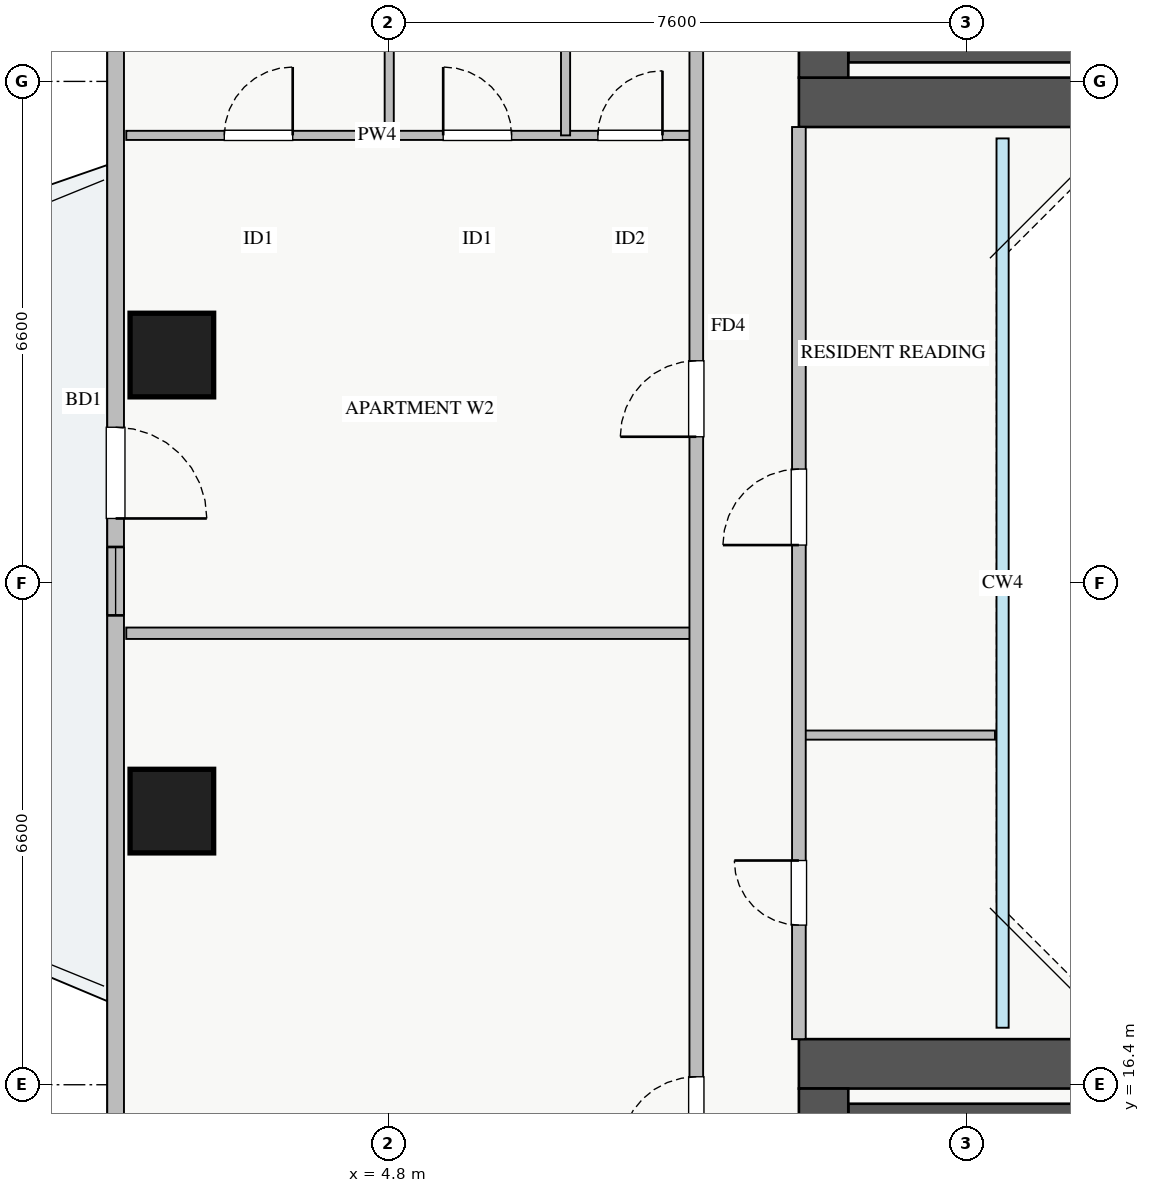
"""IFC4 building model, lengths in metres.
Left out: names, types, materials, properties, quantities, classifications, styles, units other than length and angle.
Written with IfcOpenShell. Run it as: python <this file> out.ifc"""

import sys

from ifc_helpers import new_model, si_unit, direction, frame, frame_2d, origin, origin_2d, place, context, subcontext, project, spatial, rectangle, extrude, source, transform, mapped, element, fill, save


model = new_model("IFC4")
c1 = context("Model", 3, precision=1e-05, world=origin(), true_north=direction((0.0, 1.0)))
c2 = subcontext(c1, "Body", "Model", "MODEL_VIEW")
j1 = project(units=[si_unit("LENGTHUNIT", "METRE"), si_unit("PLANEANGLEUNIT", "RADIAN")], contexts=[c1])
p1 = place(None, origin())
s1 = spatial("IfcSite", under=j1, at=p1, CompositionType="ELEMENT")
p2 = place(p1, origin())
s2 = spatial("IfcBuilding", under=s1, at=p2, CompositionType="ELEMENT")
p3 = place(p2, frame((0.0, 0.0, 119.75)))
s3 = spatial("IfcBuildingStorey", under=s2, at=p3, CompositionType="ELEMENT", Elevation=119.75)
for number, where, z_axis, x_axis in (
    (1, (10.85, 29.95, 0.0), (0.0, 0.0, 1.0), (1.0, 0.0, 0.0)),
    (2, (10.85, 16.05, 0.0), (0.0, 0.0, 1.0), (1.0, 0.0, 0.0)),
):
    element("IfcWall", number, at=place(p3, frame(where, z_axis=z_axis, x_axis=x_axis)), inside=s3, PredefinedType="SHEAR", context=c2, shape_type="SweptSolid", body=[
        extrude(rectangle(XDim=7.3, YDim=0.2, at=frame_2d((3.65, 0.0))), origin(), (0.0, 0.0, 1.0), 3.25),
    ])
p4 = place(p3, frame((10.2, 29.325, 0.0), z_axis=(0.0, 0.0, 1.0), x_axis=(1.0, 0.0, 0.0)))
e3 = element("IfcWall", 3, at=p4, inside=s3, PredefinedType="SHEAR", context=c2, shape_type="SweptSolid", body=[
    extrude(rectangle(XDim=17.6, YDim=0.65, at=frame_2d((8.8, 0.0))), origin(), (0.0, 0.0, 1.0), 3.25),
])
p5 = place(p3, frame((10.525, 29.65, 0.0), z_axis=(0.0, 0.0, 1.0), x_axis=(0.0, 1.0, 0.0)))
e4 = element("IfcWall", 4, at=p5, inside=s3, PredefinedType="SHEAR", context=c2, shape_type="SweptSolid", body=[
    extrude(rectangle(XDim=5.9, YDim=0.65, at=frame_2d((2.95, 0.0))), origin(), (0.0, 0.0, 1.0), 3.25),
])
p6 = place(p3, frame((10.2, 16.675, 0.0), z_axis=(0.0, 0.0, 1.0), x_axis=(1.0, 0.0, 0.0)))
e5 = element("IfcWall", 5, at=p6, inside=s3, PredefinedType="SHEAR", context=c2, shape_type="SweptSolid", body=[
    extrude(rectangle(XDim=17.6, YDim=0.65, at=frame_2d((8.8, 0.0))), origin(), (0.0, 0.0, 1.0), 3.25),
])
p7 = place(p3, frame((10.525, 10.45, 0.0), z_axis=(0.0, 0.0, 1.0), x_axis=(0.0, 1.0, 0.0)))
e6 = element("IfcWall", 6, at=p7, inside=s3, PredefinedType="SHEAR", context=c2, shape_type="SweptSolid", body=[
    extrude(rectangle(XDim=5.9, YDim=0.65, at=frame_2d((2.95, 0.0))), origin(), (0.0, 0.0, 1.0), 3.25),
])
m1 = source(origin(), c2, "Body", "SweptSolid", [
    extrude(rectangle(XDim=1.1, YDim=1.1, at=origin_2d()), origin(), (0.0, 0.0, 1.0), 3.25),
])
for number, where, z_axis, x_axis in (
    (7, (1.95, 26.0, 0.0), (0.0, 0.0, 1.0), (1.0, 0.0, 0.0)),
    (8, (1.95, 20.0, 0.0), (0.0, 0.0, 1.0), (1.0, 0.0, 0.0)),
):
    element("IfcColumn", number, at=place(p3, frame(where, z_axis=z_axis, x_axis=x_axis)), inside=s3, PredefinedType="COLUMN", context=c2, shape_type="MappedRepresentation", body=[
        mapped(m1, transform((0.0, 0.0, 0.0), x_axis=(1.0, 0.0, 0.0), y_axis=(0.0, 1.0, 0.0), z_axis=(0.0, 0.0, 1.0), scale=1.0)),
    ])
p8 = place(p3, frame((1.21, 10.55, 0.0), z_axis=(0.0, 0.0, 1.0), x_axis=(0.0, 1.0, 0.0)))
e9 = element("IfcWall", 9, at=p8, inside=s3, PredefinedType="STANDARD", context=c2, shape_type="SweptSolid", body=[
    extrude(rectangle(XDim=24.9, YDim=0.22, at=frame_2d((12.45, 0.0))), origin(), (0.0, 0.0, 1.0), 2.61),
])
p9 = place(p8, frame((13.3, 0.0, 0.0)))
e10 = element("IfcOpeningElement", 10, at=p9, cuts=e9, PredefinedType="OPENING", context=c2, shape_type="SweptSolid", body=[
    extrude(rectangle(XDim=1.2, YDim=2.1, at=frame_2d((0.6, 1.05))), frame((0.0, 0.12, 0.0), z_axis=(0.0, -1.0, 0.0), x_axis=(1.0, 0.0, 0.0)), (0.0, 0.0, 1.0), 0.24),
])
p10 = place(p8, frame((1.912, 0.0, 0.9)))
e11 = element("IfcOpeningElement", 11, at=p10, cuts=e9, PredefinedType="OPENING", context=c2, shape_type="SweptSolid", body=[
    extrude(rectangle(XDim=2.4, YDim=1.48, at=frame_2d((1.2, 0.74))), frame((0.0, 0.12, 0.0), z_axis=(0.0, -1.0, 0.0), x_axis=(1.0, 0.0, 0.0)), (0.0, 0.0, 1.0), 0.24),
])
p11 = place(p8, frame((20.737, 0.0, 0.9)))
e12 = element("IfcOpeningElement", 12, at=p11, cuts=e9, PredefinedType="OPENING", context=c2, shape_type="SweptSolid", body=[
    extrude(rectangle(XDim=2.1, YDim=1.48, at=frame_2d((1.05, 0.74))), frame((0.0, 0.12, 0.0), z_axis=(0.0, -1.0, 0.0), x_axis=(1.0, 0.0, 0.0)), (0.0, 0.0, 1.0), 0.24),
])
p12 = place(p8, frame((12.025, 0.0, 0.9)))
e13 = element("IfcOpeningElement", 13, at=p12, cuts=e9, PredefinedType="OPENING", context=c2, shape_type="SweptSolid", body=[
    extrude(rectangle(XDim=0.9, YDim=1.2, at=frame_2d((0.45, 0.6))), frame((0.0, 0.12, 0.0), z_axis=(0.0, -1.0, 0.0), x_axis=(1.0, 0.0, 0.0)), (0.0, 0.0, 1.0), 0.24),
])
p13 = place(p3, frame((1.35, 28.89, 0.0), z_axis=(0.0, 0.0, 1.0), x_axis=(1.0, 0.0, 0.0)))
e14 = element("IfcWall", 14, at=p13, inside=s3, PredefinedType="PLUMBINGWALL", context=c2, shape_type="SweptSolid", body=[
    extrude(rectangle(XDim=7.5, YDim=0.12, at=frame_2d((3.75, 0.0))), origin(), (0.0, 0.0, 1.0), 3.07),
])
p14 = place(p13, frame((1.29, 0.0, 0.0)))
e15 = element("IfcOpeningElement", 15, at=p14, cuts=e14, PredefinedType="OPENING", context=c2, shape_type="SweptSolid", body=[
    extrude(rectangle(XDim=0.9, YDim=2.05, at=frame_2d((0.45, 1.025))), frame((0.0, 0.07, 0.0), z_axis=(0.0, -1.0, 0.0), x_axis=(1.0, 0.0, 0.0)), (0.0, 0.0, 1.0), 0.14),
])
p15 = place(p13, frame((4.17, 0.0, 0.0)))
e16 = element("IfcOpeningElement", 16, at=p15, cuts=e14, PredefinedType="OPENING", context=c2, shape_type="SweptSolid", body=[
    extrude(rectangle(XDim=0.9, YDim=2.05, at=frame_2d((0.45, 1.025))), frame((0.0, 0.07, 0.0), z_axis=(0.0, -1.0, 0.0), x_axis=(1.0, 0.0, 0.0)), (0.0, 0.0, 1.0), 0.14),
])
p16 = place(p13, frame((6.205, 0.0, 0.0)))
e17 = element("IfcOpeningElement", 17, at=p16, cuts=e14, PredefinedType="OPENING", context=c2, shape_type="SweptSolid", body=[
    extrude(rectangle(XDim=0.85, YDim=2.05, at=frame_2d((0.425, 1.025))), frame((0.0, 0.07, 0.0), z_axis=(0.0, -1.0, 0.0), x_axis=(1.0, 0.0, 0.0)), (0.0, 0.0, 1.0), 0.14),
])
p17 = place(p3, frame((4.81, 28.89, 0.0), z_axis=(0.0, 0.0, 1.0), x_axis=(0.0, 1.0, 0.0)))
e18 = element("IfcWall", 18, at=p17, inside=s3, PredefinedType="PLUMBINGWALL", context=c2, shape_type="SweptSolid", body=[
    extrude(rectangle(XDim=7.09, YDim=0.12, at=frame_2d((3.545, 0.0))), origin(), (0.0, 0.0, 1.0), 3.07),
])
p18 = place(p3, frame((7.13, 28.89, 0.0), z_axis=(0.0, 0.0, 1.0), x_axis=(0.0, 1.0, 0.0)))
e19 = element("IfcWall", 19, at=p18, inside=s3, PredefinedType="PLUMBINGWALL", context=c2, shape_type="SweptSolid", body=[
    extrude(rectangle(XDim=7.09, YDim=0.12, at=frame_2d((3.545, 0.0))), origin(), (0.0, 0.0, 1.0), 2.577),
])
p19 = place(p3, frame((1.35, 22.34, 0.0), z_axis=(0.0, 0.0, 1.0), x_axis=(1.0, 0.0, 0.0)))
e20 = element("IfcWall", 20, at=p19, inside=s3, PredefinedType="PARTITIONING", context=c2, shape_type="SweptSolid", body=[
    extrude(rectangle(XDim=7.5, YDim=0.15, at=frame_2d((3.75, 0.0))), origin(), (0.0, 0.0, 1.0), 3.07),
])
p20 = place(p3, frame((8.85, 8.25, 0.0), z_axis=(0.0, 0.0, 1.0), x_axis=(0.0, 1.0, 0.0)))
e21 = element("IfcWall", 21, at=p20, inside=s3, PredefinedType="PARTITIONING", context=c2, shape_type="SweptSolid", body=[
    extrude(rectangle(XDim=29.5, YDim=0.18, at=frame_2d((14.75, 0.0))), origin(), (0.0, 0.0, 1.0), 3.07),
])
p21 = place(p20, frame((28.155, 0.0, 0.0)))
e22 = element("IfcOpeningElement", 22, at=p21, cuts=e21, PredefinedType="OPENING", context=c2, shape_type="SweptSolid", body=[
    extrude(rectangle(XDim=0.9, YDim=2.05, at=frame_2d((0.45, 1.025))), frame((0.0, 0.1, 0.0), z_axis=(0.0, -1.0, 0.0), x_axis=(1.0, 0.0, 0.0)), (0.0, 0.0, 1.0), 0.2),
])
p22 = place(p20, frame((0.27, 0.0, 0.0)))
e23 = element("IfcOpeningElement", 23, at=p22, cuts=e21, PredefinedType="OPENING", context=c2, shape_type="SweptSolid", body=[
    extrude(rectangle(XDim=0.9, YDim=2.05, at=frame_2d((0.45, 1.025))), frame((0.0, 0.1, 0.0), z_axis=(0.0, -1.0, 0.0), x_axis=(1.0, 0.0, 0.0)), (0.0, 0.0, 1.0), 0.2),
])
p23 = place(p20, frame((7.255, 0.0, 0.0)))
e24 = element("IfcOpeningElement", 24, at=p23, cuts=e21, PredefinedType="OPENING", context=c2, shape_type="SweptSolid", body=[
    extrude(rectangle(XDim=1.0, YDim=2.05, at=frame_2d((0.5, 1.025))), frame((0.0, 0.1, 0.0), z_axis=(0.0, -1.0, 0.0), x_axis=(1.0, 0.0, 0.0)), (0.0, 0.0, 1.0), 0.2),
])
p24 = place(p20, frame((16.675, 0.0, 0.0)))
e25 = element("IfcOpeningElement", 25, at=p24, cuts=e21, PredefinedType="OPENING", context=c2, shape_type="SweptSolid", body=[
    extrude(rectangle(XDim=1.0, YDim=2.05, at=frame_2d((0.5, 1.025))), frame((0.0, 0.1, 0.0), z_axis=(0.0, -1.0, 0.0), x_axis=(1.0, 0.0, 0.0)), (0.0, 0.0, 1.0), 0.2),
])
p25 = place(p3, frame((10.2, 21.0, 0.0), z_axis=(0.0, 0.0, 1.0), x_axis=(1.0, 0.0, 0.0)))
e26 = element("IfcWall", 26, at=p25, inside=s3, PredefinedType="PLUMBINGWALL", context=c2, shape_type="SweptSolid", body=[
    extrude(rectangle(XDim=2.58, YDim=0.12, at=frame_2d((1.29, 0.0))), origin(), (0.0, 0.0, 1.0), 3.07),
])
p26 = place(p3, frame((10.2, 17.0, 0.0), z_axis=(0.0, 0.0, 1.0), x_axis=(0.0, 1.0, 0.0)))
e27 = element("IfcWall", 27, at=p26, inside=s3, PredefinedType="PARTITIONING", context=c2, shape_type="SweptSolid", body=[
    extrude(rectangle(XDim=12.0, YDim=0.18, at=frame_2d((6.0, 0.0))), origin(), (0.0, 0.0, 1.0), 3.07),
])
p27 = place(p26, frame((1.5, 0.0, 0.0)))
e28 = element("IfcOpeningElement", 28, at=p27, cuts=e27, PredefinedType="OPENING", context=c2, shape_type="SweptSolid", body=[
    extrude(rectangle(XDim=0.85, YDim=2.05, at=frame_2d((0.425, 1.025))), frame((0.0, 0.1, 0.0), z_axis=(0.0, -1.0, 0.0), x_axis=(1.0, 0.0, 0.0)), (0.0, 0.0, 1.0), 0.2),
])
p28 = place(p26, frame((6.5, 0.0, 0.0)))
e29 = element("IfcOpeningElement", 29, at=p28, cuts=e27, PredefinedType="OPENING", context=c2, shape_type="SweptSolid", body=[
    extrude(rectangle(XDim=1.0, YDim=2.05, at=frame_2d((0.5, 1.025))), frame((0.0, 0.1, 0.0), z_axis=(0.0, -1.0, 0.0), x_axis=(1.0, 0.0, 0.0)), (0.0, 0.0, 1.0), 0.2),
])
m2 = source(origin(), c2, "Body", "SweptSolid", [
    extrude(rectangle(XDim=1.2, YDim=2.1, at=frame_2d((0.6, 1.05))), frame((0.0, 0.025, 0.0), z_axis=(0.0, -1.0, 0.0), x_axis=(1.0, 0.0, 0.0)), (0.0, 0.0, 1.0), 0.05),
])
p29 = place(p9, frame((1.2, 0.0, 0.0), z_axis=(0.0, 0.0, 1.0), x_axis=(-1.0, 0.0, 0.0)))
e30 = element("IfcDoor", 30, at=p29, inside=s3, OperationType="SINGLE_SWING_LEFT", PredefinedType="DOOR", context=c2, shape_type="MappedRepresentation", body=[
    mapped(m2, transform((0.0, 0.0, 0.0), x_axis=(1.0, 0.0, 0.0), y_axis=(0.0, 1.0, 0.0), z_axis=(0.0, 0.0, 1.0), scale=1.0)),
])
fill(e10, e30)
m3 = source(origin(), c2, "Body", "SweptSolid", [
    extrude(rectangle(XDim=0.9, YDim=2.05, at=frame_2d((0.45, 1.025))), frame((0.0, 0.025, 0.0), z_axis=(0.0, -1.0, 0.0), x_axis=(1.0, 0.0, 0.0)), (0.0, 0.0, 1.0), 0.05),
])
p30 = place(p14, origin())
e31 = element("IfcDoor", 31, at=p30, inside=s3, OperationType="SINGLE_SWING_RIGHT", PredefinedType="DOOR", context=c2, shape_type="MappedRepresentation", body=[
    mapped(m3, transform((0.0, 0.0, 0.0), x_axis=(1.0, 0.0, 0.0), y_axis=(0.0, 1.0, 0.0), z_axis=(0.0, 0.0, 1.0), scale=1.0)),
])
fill(e15, e31)
p31 = place(p15, origin())
e32 = element("IfcDoor", 32, at=p31, inside=s3, OperationType="SINGLE_SWING_LEFT", PredefinedType="DOOR", context=c2, shape_type="MappedRepresentation", body=[
    mapped(m3, transform((0.0, 0.0, 0.0), x_axis=(1.0, 0.0, 0.0), y_axis=(0.0, 1.0, 0.0), z_axis=(0.0, 0.0, 1.0), scale=1.0)),
])
fill(e16, e32)
m4 = source(origin(), c2, "Body", "SweptSolid", [
    extrude(rectangle(XDim=0.85, YDim=2.05, at=frame_2d((0.425, 1.025))), frame((0.0, 0.025, 0.0), z_axis=(0.0, -1.0, 0.0), x_axis=(1.0, 0.0, 0.0)), (0.0, 0.0, 1.0), 0.05),
])
p32 = place(p16, origin())
e33 = element("IfcDoor", 33, at=p32, inside=s3, OperationType="SINGLE_SWING_RIGHT", PredefinedType="DOOR", context=c2, shape_type="MappedRepresentation", body=[
    mapped(m4, transform((0.0, 0.0, 0.0), x_axis=(1.0, 0.0, 0.0), y_axis=(0.0, 1.0, 0.0), z_axis=(0.0, 0.0, 1.0), scale=1.0)),
])
fill(e17, e33)
m5 = source(origin(), c2, "Body", "SweptSolid", [
    extrude(rectangle(XDim=1.0, YDim=2.05, at=frame_2d((0.5, 1.025))), frame((0.0, 0.025, 0.0), z_axis=(0.0, -1.0, 0.0), x_axis=(1.0, 0.0, 0.0)), (0.0, 0.0, 1.0), 0.05),
])
p33 = place(p23, origin())
e34 = element("IfcDoor", 34, at=p33, inside=s3, OperationType="SINGLE_SWING_LEFT", PredefinedType="DOOR", context=c2, shape_type="MappedRepresentation", body=[
    mapped(m5, transform((0.0, 0.0, 0.0), x_axis=(1.0, 0.0, 0.0), y_axis=(0.0, 1.0, 0.0), z_axis=(0.0, 0.0, 1.0), scale=1.0)),
])
fill(e24, e34)
p34 = place(p24, origin())
e35 = element("IfcDoor", 35, at=p34, inside=s3, OperationType="SINGLE_SWING_LEFT", PredefinedType="DOOR", context=c2, shape_type="MappedRepresentation", body=[
    mapped(m5, transform((0.0, 0.0, 0.0), x_axis=(1.0, 0.0, 0.0), y_axis=(0.0, 1.0, 0.0), z_axis=(0.0, 0.0, 1.0), scale=1.0)),
])
fill(e25, e35)
p35 = place(p27, origin())
e36 = element("IfcDoor", 36, at=p35, inside=s3, OperationType="SINGLE_SWING_RIGHT", PredefinedType="DOOR", context=c2, shape_type="MappedRepresentation", body=[
    mapped(m4, transform((0.0, 0.0, 0.0), x_axis=(1.0, 0.0, 0.0), y_axis=(0.0, 1.0, 0.0), z_axis=(0.0, 0.0, 1.0), scale=1.0)),
])
fill(e28, e36)
p36 = place(p28, origin())
e37 = element("IfcDoor", 37, at=p36, inside=s3, OperationType="SINGLE_SWING_LEFT", PredefinedType="DOOR", context=c2, shape_type="MappedRepresentation", body=[
    mapped(m5, transform((0.0, 0.0, 0.0), x_axis=(1.0, 0.0, 0.0), y_axis=(0.0, 1.0, 0.0), z_axis=(0.0, 0.0, 1.0), scale=1.0)),
])
fill(e29, e37)
m6 = source(origin(), c2, "Body", "SweptSolid", [
    extrude(rectangle(XDim=0.9, YDim=1.2, at=frame_2d((0.45, 0.6))), frame((0.0, 0.03, 0.0), z_axis=(0.0, -1.0, 0.0), x_axis=(1.0, 0.0, 0.0)), (0.0, 0.0, 1.0), 0.06),
])
p37 = place(p12, origin())
e38 = element("IfcWindow", 38, at=p37, inside=s3, PartitioningType="SINGLE_PANEL", PredefinedType="WINDOW", context=c2, shape_type="MappedRepresentation", body=[
    mapped(m6, transform((0.0, 0.0, 0.0), x_axis=(1.0, 0.0, 0.0), y_axis=(0.0, 1.0, 0.0), z_axis=(0.0, 0.0, 1.0), scale=1.0)),
])
fill(e13, e38)
save(model, sys.argv[1])
